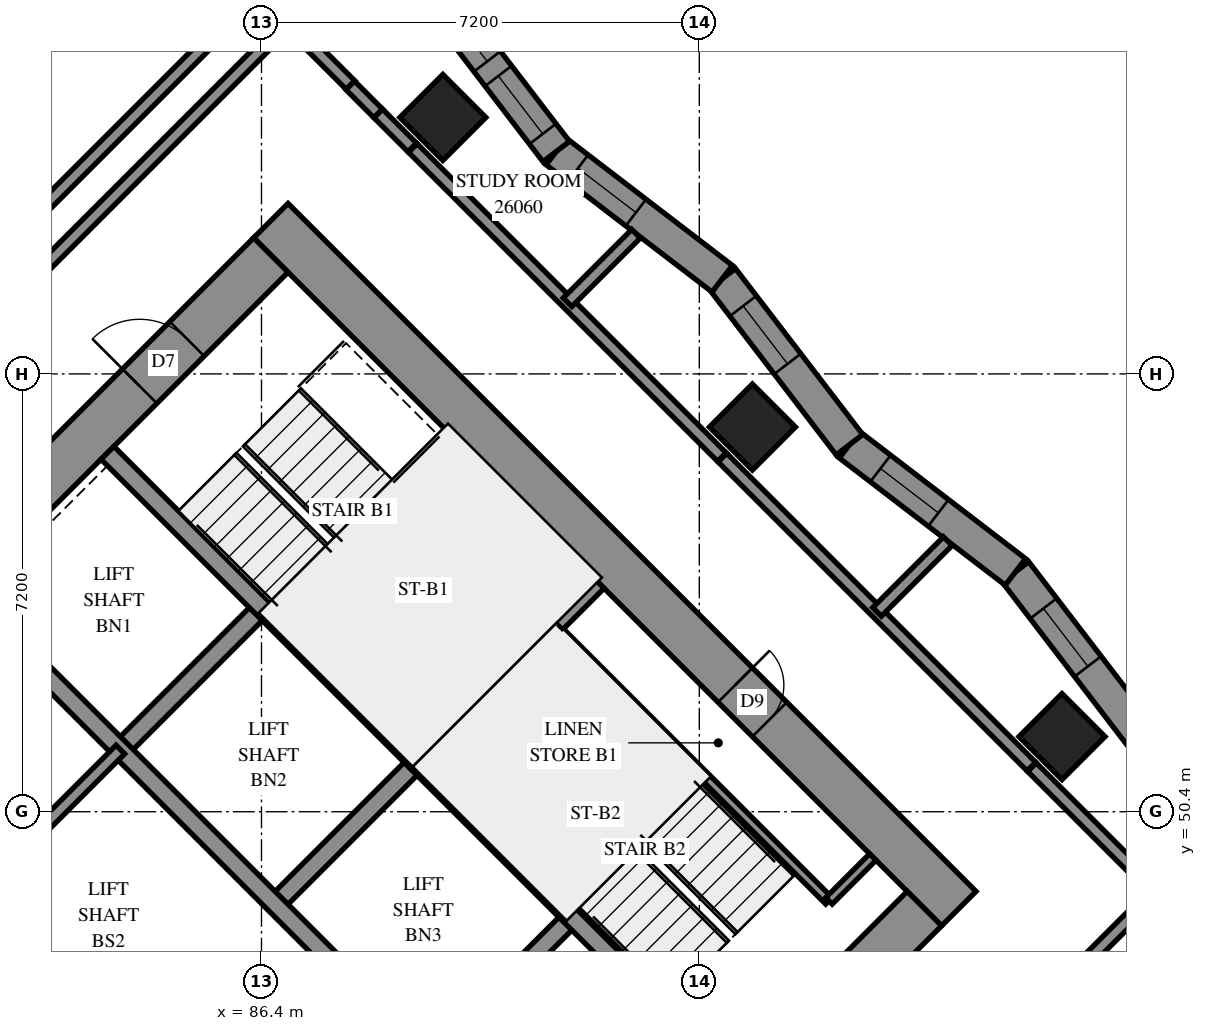
"""IFC4 building model, lengths in metres.
Left out: names, types, materials, properties, quantities, classifications, styles, units other than length and angle.
Written with IfcOpenShell. Run it as: python <this file> out.ifc"""

import sys

from ifc_helpers import new_model, si_unit, direction, frame, frame_2d, origin, origin_2d, place, context, subcontext, project, spatial, polyline, rectangle, outline, extrude, element, fill, save


model = new_model("IFC4")
c1 = context("Model", 3, precision=1e-05, world=origin(), true_north=direction((0.0, 1.0)))
c2 = subcontext(c1, "Body", "Model", "MODEL_VIEW")
j1 = project(units=[si_unit("LENGTHUNIT", "METRE"), si_unit("PLANEANGLEUNIT", "RADIAN")], contexts=[c1])
p1 = place(None, origin())
s1 = spatial("IfcSite", under=j1, at=p1, CompositionType="ELEMENT")
p2 = place(p1, origin())
s2 = spatial("IfcBuilding", under=s1, at=p2, CompositionType="ELEMENT")
p3 = place(p2, frame((0.0, 0.0, 98.2)))
s3 = spatial("IfcBuildingStorey", under=s2, at=p3, CompositionType="ELEMENT", Elevation=98.2)
for number, where, z_axis, x_axis in (
    (1, (89.382, 61.818, 0.0), (0.0, 0.0, 1.0), (0.707, -0.707, 0.0)),
    (2, (94.474, 56.727, 0.0), (0.0, 0.0, 1.0), (0.707, -0.707, 0.0)),
    (3, (99.565, 51.635, 0.0), (0.0, 0.0, 1.0), (0.707, -0.707, 0.0)),
):
    element("IfcColumn", number, at=place(p3, frame(where, z_axis=z_axis, x_axis=x_axis)), inside=s3, PredefinedType="COLUMN", context=c2, shape_type="SweptSolid", body=[
        extrude(rectangle(XDim=1.0, YDim=1.0, at=origin_2d()), origin(), (0.0, 0.0, 1.0), 3.1),
    ])
p4 = place(p3, frame((75.806, 49.373, -0.3), z_axis=(0.0, 0.0, 1.0), x_axis=(0.7071067812, -0.7071067812, 0.0)))
e4 = element("IfcWall", 4, at=p4, inside=s3, PredefinedType="SHEAR", context=c2, shape_type="SweptSolid", body=[
    extrude(rectangle(XDim=16.0, YDim=0.8, at=frame_2d((8.0, 0.0))), origin(), (0.0, 0.0, 1.0), 2.7),
])
p5 = place(p3, frame((86.554, 60.121, -0.3), z_axis=(0.0, 0.0, 1.0), x_axis=(0.7071067812, -0.7071067812, 0.0)))
e5 = element("IfcWall", 5, at=p5, inside=s3, PredefinedType="SHEAR", context=c2, shape_type="SweptSolid", body=[
    extrude(rectangle(XDim=16.0, YDim=0.8, at=frame_2d((8.0, 0.0))), origin(), (0.0, 0.0, 1.0), 2.7),
])
p6 = place(p5, frame((10.8, 0.0, 0.3)))
e6 = element("IfcOpeningElement", 6, at=p6, cuts=e5, PredefinedType="OPENING", context=c2, shape_type="SweptSolid", body=[
    extrude(rectangle(XDim=0.8, YDim=2.1, at=frame_2d((0.4, 1.05))), frame((0.0, 0.41, 0.0), z_axis=(0.0, -1.0, 0.0), x_axis=(1.0, 0.0, 0.0)), (0.0, 0.0, 1.0), 0.82),
])
p7 = place(p3, frame((76.372, 49.373, -0.3), z_axis=(0.0, 0.0, 1.0), x_axis=(0.7071067812, 0.7071067812, 0.0)))
e7 = element("IfcWall", 7, at=p7, inside=s3, PredefinedType="SHEAR", context=c2, shape_type="SweptSolid", body=[
    extrude(rectangle(XDim=14.4, YDim=0.8, at=frame_2d((7.2, 0.0))), origin(), (0.0, 0.0, 1.0), 2.7),
])
p8 = place(p7, frame((4.55, 0.0, 0.3)))
e8 = element("IfcOpeningElement", 8, at=p8, cuts=e7, PredefinedType="OPENING", context=c2, shape_type="SweptSolid", body=[
    extrude(rectangle(XDim=1.1, YDim=2.1, at=frame_2d((0.55, 1.05))), frame((0.0, 0.41, 0.0), z_axis=(0.0, -1.0, 0.0), x_axis=(1.0, 0.0, 0.0)), (0.0, 0.0, 1.0), 0.82),
])
p9 = place(p7, frame((11.35, 0.0, 0.3)))
e9 = element("IfcOpeningElement", 9, at=p9, cuts=e7, PredefinedType="OPENING", context=c2, shape_type="SweptSolid", body=[
    extrude(rectangle(XDim=1.1, YDim=2.1, at=frame_2d((0.55, 1.05))), frame((0.0, 0.41, 0.0), z_axis=(0.0, -1.0, 0.0), x_axis=(1.0, 0.0, 0.0)), (0.0, 0.0, 1.0), 0.82),
])
p10 = place(p3, frame((87.12, 38.625, -0.3), z_axis=(0.0, 0.0, 1.0), x_axis=(0.7071067812, 0.7071067812, 0.0)))
e10 = element("IfcWall", 10, at=p10, inside=s3, PredefinedType="SHEAR", context=c2, shape_type="SweptSolid", body=[
    extrude(rectangle(XDim=14.4, YDim=0.8, at=frame_2d((7.2, 0.0))), origin(), (0.0, 0.0, 1.0), 2.7),
])
p11 = place(p10, frame((4.55, 0.0, 0.3)))
e11 = element("IfcOpeningElement", 11, at=p11, cuts=e10, PredefinedType="OPENING", context=c2, shape_type="SweptSolid", body=[
    extrude(rectangle(XDim=1.1, YDim=2.1, at=frame_2d((0.55, 1.05))), frame((0.0, 0.41, 0.0), z_axis=(0.0, -1.0, 0.0), x_axis=(1.0, 0.0, 0.0)), (0.0, 0.0, 1.0), 0.82),
])
p12 = place(p10, frame((11.35, 0.0, 0.3)))
e12 = element("IfcOpeningElement", 12, at=p12, cuts=e10, PredefinedType="OPENING", context=c2, shape_type="SweptSolid", body=[
    extrude(rectangle(XDim=1.1, YDim=2.1, at=frame_2d((0.55, 1.05))), frame((0.0, 0.41, 0.0), z_axis=(0.0, -1.0, 0.0), x_axis=(1.0, 0.0, 0.0)), (0.0, 0.0, 1.0), 0.82),
])
p13 = place(p3, frame((84.079, 51.423, 0.0), z_axis=(0.0, 0.0, 1.0), x_axis=(0.7071219326, 0.7070916295, 0.0)))
e13 = element("IfcWall", 13, at=p13, inside=s3, PredefinedType="SOLIDWALL", context=c2, shape_type="SweptSolid", body=[
    extrude(rectangle(XDim=3.3, YDim=0.3, at=frame_2d((1.65, 0.0))), origin(), (0.0, 0.0, 1.0), 3.1),
])
for number, where, z_axis, x_axis in (
    (14, (86.625, 48.878, 0.0), (0.0, 0.0, 1.0), (0.707, 0.707, 0.0)),
    (15, (89.17, 46.332, 0.0), (0.0, 0.0, 1.0), (0.707, 0.707, 0.0)),
):
    element("IfcWall", number, at=place(p3, frame(where, z_axis=z_axis, x_axis=x_axis)), inside=s3, PredefinedType="SOLIDWALL", context=c2, shape_type="SweptSolid", body=[
        extrude(rectangle(XDim=3.3, YDim=0.3, at=frame_2d((1.65, 0.0))), origin(), (0.0, 0.0, 1.0), 3.1),
    ])
p14 = place(p3, frame((78.988, 51.423, 0.0), z_axis=(0.0, 0.0, 1.0), x_axis=(0.7071067812, -0.7071067812, 0.0)))
e16 = element("IfcWall", 16, at=p14, inside=s3, PredefinedType="SOLIDWALL", context=c2, shape_type="SweptSolid", body=[
    extrude(rectangle(XDim=14.4, YDim=0.3, at=frame_2d((7.2, 0.0))), origin(), (0.0, 0.0, 1.0), 3.1),
])
p15 = place(p14, frame((1.25, 0.0, 0.0)))
e17 = element("IfcOpeningElement", 17, at=p15, cuts=e16, PredefinedType="OPENING", context=c2, shape_type="SweptSolid", body=[
    extrude(rectangle(XDim=1.1, YDim=2.1, at=frame_2d((0.55, 1.05))), frame((0.0, 0.16, 0.0), z_axis=(0.0, -1.0, 0.0), x_axis=(1.0, 0.0, 0.0)), (0.0, 0.0, 1.0), 0.32),
])
p16 = place(p14, frame((4.85, 0.0, 0.0)))
e18 = element("IfcOpeningElement", 18, at=p16, cuts=e16, PredefinedType="OPENING", context=c2, shape_type="SweptSolid", body=[
    extrude(rectangle(XDim=1.1, YDim=2.1, at=frame_2d((0.55, 1.05))), frame((0.0, 0.16, 0.0), z_axis=(0.0, -1.0, 0.0), x_axis=(1.0, 0.0, 0.0)), (0.0, 0.0, 1.0), 0.32),
])
p17 = place(p14, frame((8.45, 0.0, 0.0)))
e19 = element("IfcOpeningElement", 19, at=p17, cuts=e16, PredefinedType="OPENING", context=c2, shape_type="SweptSolid", body=[
    extrude(rectangle(XDim=1.1, YDim=2.1, at=frame_2d((0.55, 1.05))), frame((0.0, 0.16, 0.0), z_axis=(0.0, -1.0, 0.0), x_axis=(1.0, 0.0, 0.0)), (0.0, 0.0, 1.0), 0.32),
])
p18 = place(p14, frame((12.05, 0.0, 0.0)))
e20 = element("IfcOpeningElement", 20, at=p18, cuts=e16, PredefinedType="OPENING", context=c2, shape_type="SweptSolid", body=[
    extrude(rectangle(XDim=1.1, YDim=2.1, at=frame_2d((0.55, 1.05))), frame((0.0, 0.16, 0.0), z_axis=(0.0, -1.0, 0.0), x_axis=(1.0, 0.0, 0.0)), (0.0, 0.0, 1.0), 0.32),
])
p19 = place(p3, frame((81.534, 53.969, 0.0), z_axis=(0.0, 0.0, 1.0), x_axis=(0.707103309, -0.7071102534, 0.0)))
e21 = element("IfcWall", 21, at=p19, inside=s3, PredefinedType="SOLIDWALL", context=c2, shape_type="SweptSolid", body=[
    extrude(rectangle(XDim=14.4, YDim=0.3, at=frame_2d((7.2, 0.0))), origin(), (0.0, 0.0, 1.0), 3.1),
])
p20 = place(p19, frame((12.05, 0.0, 0.0)))
e22 = element("IfcOpeningElement", 22, at=p20, cuts=e21, PredefinedType="OPENING", context=c2, shape_type="SweptSolid", body=[
    extrude(rectangle(XDim=1.1, YDim=2.1, at=frame_2d((0.55, 1.05))), frame((0.0, 0.16, 0.0), z_axis=(0.0, -1.0, 0.0), x_axis=(1.0, 0.0, 0.0)), (0.0, 0.0, 1.0), 0.32),
])
for number, where, z_axis, x_axis in (
    (23, (83.867, 56.302, 0.0), (0.0, 0.0, 1.0), (0.707, -0.707, 0.0)),
    (24, (88.958, 51.211, 0.0), (0.0, 0.0, 1.0), (0.707, -0.707, 0.0)),
):
    element("IfcWall", number, at=place(p3, frame(where, z_axis=z_axis, x_axis=x_axis)), inside=s3, PredefinedType="SOLIDWALL", context=c2, shape_type="SweptSolid", body=[
        extrude(rectangle(XDim=7.2, YDim=0.3, at=frame_2d((3.6, 0.0))), origin(), (0.0, 0.0, 1.0), 3.1),
    ])
p21 = place(p3, frame((88.958, 51.211, 0.0), z_axis=(0.0, 0.0, 1.0), x_axis=(0.7071067812, 0.7071067812, 0.0)))
e25 = element("IfcWall", 25, at=p21, inside=s3, PredefinedType="SOLIDWALL", context=c2, shape_type="SweptSolid", body=[
    extrude(rectangle(XDim=4.2, YDim=0.3, at=frame_2d((2.1, 0.0))), origin(), (0.0, 0.0, 1.0), 3.1),
])
p22 = place(p3, frame((100.891, 51.614, 0.0), z_axis=(0.0, 0.0, 1.0), x_axis=(-0.6082581669, 0.7937392534, 0.0)))
e26 = element("IfcWall", 26, at=p22, inside=s3, PredefinedType="SOLIDWALL", context=c2, shape_type="SweptSolid", body=[
    extrude(outline(polyline([(0.036, -0.275), (3.475, -0.275), (3.403, 0.275), (-0.036, 0.275), (0.036, -0.275)])), origin(), (0.0, 0.0, 1.0), 3.1),
])
p23 = place(p22, frame((1.482, 0.0, 0.5)))
e27 = element("IfcOpeningElement", 27, at=p23, cuts=e26, PredefinedType="OPENING", context=c2, shape_type="SweptSolid", body=[
    extrude(rectangle(XDim=1.2, YDim=2.45, at=frame_2d((0.6, 1.225))), frame((0.0, 0.285, 0.0), z_axis=(0.0, -1.0, 0.0), x_axis=(1.0, 0.0, 0.0)), (0.0, 0.0, 1.0), 0.57),
])
p24 = place(p3, frame((98.799, 54.344, 0.0), z_axis=(0.0, 0.0, 1.0), x_axis=(-0.7937392534, 0.6082581669, 0.0)))
e28 = element("IfcWall", 28, at=p24, inside=s3, PredefinedType="SOLIDWALL", context=c2, shape_type="SweptSolid", body=[
    extrude(outline(polyline([(-0.036, -0.275), (3.403, -0.275), (3.475, 0.275), (0.036, 0.275), (-0.036, -0.275)])), origin(), (0.0, 0.0, 1.0), 3.1),
])
p25 = place(p24, frame((1.596, 0.0, 0.5)))
e29 = element("IfcOpeningElement", 29, at=p25, cuts=e28, PredefinedType="OPENING", context=c2, shape_type="SweptSolid", body=[
    extrude(rectangle(XDim=1.2, YDim=2.45, at=frame_2d((0.6, 1.225))), frame((0.0, 0.285, 0.0), z_axis=(0.0, -1.0, 0.0), x_axis=(1.0, 0.0, 0.0)), (0.0, 0.0, 1.0), 0.57),
])
p26 = place(p3, frame((96.069, 56.436, 0.0), z_axis=(0.0, 0.0, 1.0), x_axis=(-0.6082581669, 0.7937392534, 0.0)))
e30 = element("IfcWall", 30, at=p26, inside=s3, PredefinedType="SOLIDWALL", context=c2, shape_type="SweptSolid", body=[
    extrude(outline(polyline([(0.036, -0.275), (3.475, -0.275), (3.403, 0.275), (-0.036, 0.275), (0.036, -0.275)])), origin(), (0.0, 0.0, 1.0), 3.1),
])
p27 = place(p26, frame((1.674, 0.0, 0.5)))
e31 = element("IfcOpeningElement", 31, at=p27, cuts=e30, PredefinedType="OPENING", context=c2, shape_type="SweptSolid", body=[
    extrude(rectangle(XDim=1.2, YDim=2.45, at=frame_2d((0.6, 1.225))), frame((0.0, 0.285, 0.0), z_axis=(0.0, -1.0, 0.0), x_axis=(1.0, 0.0, 0.0)), (0.0, 0.0, 1.0), 0.57),
])
p28 = place(p3, frame((93.977, 59.166, 0.0), z_axis=(0.0, 0.0, 1.0), x_axis=(-0.7937392534, 0.6082581669, 0.0)))
e32 = element("IfcWall", 32, at=p28, inside=s3, PredefinedType="SOLIDWALL", context=c2, shape_type="SweptSolid", body=[
    extrude(outline(polyline([(-0.036, -0.275), (3.403, -0.275), (3.475, 0.275), (0.036, 0.275), (-0.036, -0.275)])), origin(), (0.0, 0.0, 1.0), 3.1),
])
p29 = place(p28, frame((1.788, 0.0, 0.5)))
e33 = element("IfcOpeningElement", 33, at=p29, cuts=e32, PredefinedType="OPENING", context=c2, shape_type="SweptSolid", body=[
    extrude(rectangle(XDim=1.2, YDim=2.45, at=frame_2d((0.6, 1.225))), frame((0.0, 0.285, 0.0), z_axis=(0.0, -1.0, 0.0), x_axis=(1.0, 0.0, 0.0)), (0.0, 0.0, 1.0), 0.57),
])
p30 = place(p3, frame((91.247, 61.257, 0.0), z_axis=(0.0, 0.0, 1.0), x_axis=(-0.6082581669, 0.7937392534, 0.0)))
e34 = element("IfcWall", 34, at=p30, inside=s3, PredefinedType="SOLIDWALL", context=c2, shape_type="SweptSolid", body=[
    extrude(outline(polyline([(0.036, -0.275), (3.475, -0.275), (3.403, 0.275), (-0.036, 0.275), (0.036, -0.275)])), origin(), (0.0, 0.0, 1.0), 3.1),
])
p31 = place(p30, frame((0.365, 0.0, 0.5)))
e35 = element("IfcOpeningElement", 35, at=p31, cuts=e34, PredefinedType="OPENING", context=c2, shape_type="SweptSolid", body=[
    extrude(rectangle(XDim=1.2, YDim=2.45, at=frame_2d((0.6, 1.225))), frame((0.0, 0.285, 0.0), z_axis=(0.0, -1.0, 0.0), x_axis=(1.0, 0.0, 0.0)), (0.0, 0.0, 1.0), 0.57),
])
p32 = place(p30, frame((1.866, 0.0, 0.5)))
e36 = element("IfcOpeningElement", 36, at=p32, cuts=e34, PredefinedType="OPENING", context=c2, shape_type="SweptSolid", body=[
    extrude(rectangle(XDim=1.2, YDim=2.45, at=frame_2d((0.6, 1.225))), frame((0.0, 0.285, 0.0), z_axis=(0.0, -1.0, 0.0), x_axis=(1.0, 0.0, 0.0)), (0.0, 0.0, 1.0), 0.57),
])
p33 = place(p3, frame((91.313, 53.354, 0.0), z_axis=(0.0, 0.0, 1.0), x_axis=(0.7071147811, -0.7070987812, 0.0)))
e37 = element("IfcWall", 37, at=p33, inside=s3, PredefinedType="PARTITIONING", context=c2, shape_type="SweptSolid", body=[
    extrude(rectangle(XDim=6.25, YDim=0.15, at=frame_2d((3.125, 0.0))), origin(), (0.0, 0.0, 1.0), 3.1),
])
p34 = place(p3, frame((95.732, 48.934, 0.0), z_axis=(0.0, 0.0, 1.0), x_axis=(0.7071067812, 0.7071067812, 0.0)))
e38 = element("IfcWall", 38, at=p34, inside=s3, PredefinedType="PARTITIONING", context=c2, shape_type="SweptSolid", body=[
    extrude(rectangle(XDim=1.02, YDim=0.15, at=frame_2d((0.51, 0.0))), origin(), (0.0, 0.0, 1.0), 3.1),
])
p35 = place(p3, frame((81.534, 48.878, 0.0), z_axis=(0.0, 0.0, 1.0), x_axis=(0.707092892, 0.7071206701, 0.0)))
e39 = element("IfcWall", 39, at=p35, inside=s3, PredefinedType="PARTITIONING", context=c2, shape_type="SweptSolid", body=[
    extrude(rectangle(XDim=3.6, YDim=0.2, at=frame_2d((1.8, 0.0))), origin(), (0.0, 0.0, 1.0), 3.1),
])
p36 = place(p3, frame((94.615, 42.587, 0.0), z_axis=(0.0, 0.0, 1.0), x_axis=(0.7071067812, 0.7071067812, 0.0)))
e40 = element("IfcWall", 40, at=p36, inside=s3, PredefinedType="PARTITIONING", context=c2, shape_type="SweptSolid", body=[
    extrude(rectangle(XDim=9.198, YDim=0.2, at=frame_2d((4.599, 0.0))), origin(), (0.0, 0.0, 1.0), 3.1),
])
p37 = place(p36, frame((0.248, 0.0, 0.0)))
e41 = element("IfcOpeningElement", 41, at=p37, cuts=e40, PredefinedType="OPENING", context=c2, shape_type="SweptSolid", body=[
    extrude(rectangle(XDim=1.0, YDim=2.1, at=frame_2d((0.5, 1.05))), frame((0.0, 0.11, 0.0), z_axis=(0.0, -1.0, 0.0), x_axis=(1.0, 0.0, 0.0)), (0.0, 0.0, 1.0), 0.22),
])
p38 = place(p3, frame((80.949, 58.477, 0.0), z_axis=(0.0, 0.0, 1.0), x_axis=(0.7071067812, 0.7071067812, 0.0)))
e42 = element("IfcWall", 42, at=p38, inside=s3, PredefinedType="PARTITIONING", context=c2, shape_type="SweptSolid", body=[
    extrude(rectangle(XDim=9.169, YDim=0.2, at=frame_2d((4.585, 0.0))), origin(), (0.0, 0.0, 1.0), 3.1),
])
p39 = place(p3, frame((96.805, 43.787, 0.0), z_axis=(0.0, 0.0, 1.0), x_axis=(0.7071126661, 0.7071008962, 0.0)))
e43 = element("IfcWall", 43, at=p39, inside=s3, PredefinedType="PARTITIONING", context=c2, shape_type="SweptSolid", body=[
    extrude(rectangle(XDim=8.496, YDim=0.2, at=frame_2d((4.248, 0.0))), origin(), (0.0, 0.0, 1.0), 3.1),
])
p40 = place(p3, frame((80.951, 57.489, 0.0), z_axis=(0.0, 0.0, 1.0), x_axis=(0.7071067812, 0.7071067812, 0.0)))
e44 = element("IfcWall", 44, at=p40, inside=s3, PredefinedType="PARTITIONING", context=c2, shape_type="SweptSolid", body=[
    extrude(rectangle(XDim=8.321, YDim=0.2, at=frame_2d((4.161, 0.0))), origin(), (0.0, 0.0, 1.0), 3.1),
])
p41 = place(p40, frame((0.851, 0.0, 0.0)))
e45 = element("IfcOpeningElement", 45, at=p41, cuts=e44, PredefinedType="OPENING", context=c2, shape_type="SweptSolid", body=[
    extrude(rectangle(XDim=1.0, YDim=2.1, at=frame_2d((0.5, 1.05))), frame((0.0, 0.11, 0.0), z_axis=(0.0, -1.0, 0.0), x_axis=(1.0, 0.0, 0.0)), (0.0, 0.0, 1.0), 0.22),
])
p42 = place(p3, frame((88.889, 61.315, 0.0), z_axis=(0.0, 0.0, 1.0), x_axis=(0.7071067812, -0.7071067812, 0.0)))
e46 = element("IfcWall", 46, at=p42, inside=s3, PredefinedType="PARTITIONING", context=c2, shape_type="SweptSolid", body=[
    extrude(rectangle(XDim=7.187, YDim=0.2, at=frame_2d((3.594, 0.0))), origin(), (0.0, 0.0, 1.0), 3.1),
])
p43 = place(p3, frame((93.981, 56.223, 0.0), z_axis=(0.0, 0.0, 1.0), x_axis=(0.7071067812, -0.7071067812, 0.0)))
e47 = element("IfcWall", 47, at=p43, inside=s3, PredefinedType="PARTITIONING", context=c2, shape_type="SweptSolid", body=[
    extrude(rectangle(XDim=7.184, YDim=0.2, at=frame_2d((3.592, 0.0))), origin(), (0.0, 0.0, 1.0), 3.1),
])
p44 = place(p3, frame((99.071, 51.133, 0.0), z_axis=(0.0, 0.0, 1.0), x_axis=(0.7071067812, -0.7071067812, 0.0)))
e48 = element("IfcWall", 48, at=p44, inside=s3, PredefinedType="PARTITIONING", context=c2, shape_type="SweptSolid", body=[
    extrude(rectangle(XDim=2.893, YDim=0.2, at=frame_2d((1.447, 0.0))), origin(), (0.0, 0.0, 1.0), 3.1),
])
p45 = place(p3, frame((96.523, 53.687, 0.0), z_axis=(0.0, 0.0, 1.0), x_axis=(0.7070763817, 0.7071371793, 0.0)))
e49 = element("IfcWall", 49, at=p45, inside=s3, PredefinedType="PARTITIONING", context=c2, shape_type="SweptSolid", body=[
    extrude(rectangle(XDim=1.645, YDim=0.2, at=frame_2d((0.822, 0.0))), origin(), (0.0, 0.0, 1.0), 3.1),
])
p46 = place(p3, frame((91.432, 58.778, 0.0), z_axis=(0.0, 0.0, 1.0), x_axis=(0.7070754218, 0.7071381392, 0.0)))
e50 = element("IfcWall", 50, at=p46, inside=s3, PredefinedType="PARTITIONING", context=c2, shape_type="SweptSolid", body=[
    extrude(rectangle(XDim=1.595, YDim=0.2, at=frame_2d((0.797, 0.0))), origin(), (0.0, 0.0, 1.0), 3.1),
])
p47 = place(p3, frame((86.839, 63.373, 0.0), z_axis=(0.0, 0.0, 1.0), x_axis=(0.7077963046, -0.7064165847, 0.0)))
e51 = element("IfcWall", 51, at=p47, inside=s3, PredefinedType="PARTITIONING", context=c2, shape_type="SweptSolid", body=[
    extrude(rectangle(XDim=1.45, YDim=0.2, at=frame_2d((0.725, 0.0))), origin(), (0.0, 0.0, 1.0), 3.1),
])
p48 = place(p3, frame((88.319, 61.885, 0.0), z_axis=(0.0, 0.0, 1.0), x_axis=(0.7071067812, -0.7071067812, 0.0)))
e52 = element("IfcWall", 52, at=p48, inside=s3, PredefinedType="PARTITIONING", context=c2, shape_type="SweptSolid", body=[
    extrude(rectangle(XDim=0.792, YDim=0.2, at=frame_2d((0.396, 0.0))), origin(), (0.0, 0.0, 1.0), 3.1),
])
p49 = place(p3, frame((87.861, 62.344, 0.0), z_axis=(0.0, 0.0, 1.0), x_axis=(0.7055645691, -0.708645637, 0.0)))
e53 = element("IfcWall", 53, at=p49, inside=s3, PredefinedType="PARTITIONING", context=c2, shape_type="SweptSolid", body=[
    extrude(rectangle(XDim=0.649, YDim=0.2, at=frame_2d((0.325, 0.0))), origin(), (0.0, 0.0, 1.0), 3.1),
])
p50 = place(p23, origin())
e54 = element("IfcWindow", 54, at=p50, inside=s3, PartitioningType="SINGLE_PANEL", PredefinedType="WINDOW", context=c2, shape_type="SweptSolid", body=[
    extrude(rectangle(XDim=1.2, YDim=2.45, at=frame_2d((0.6, 1.225))), frame((0.0, 0.155, 0.0), z_axis=(0.0, -1.0, 0.0), x_axis=(1.0, 0.0, 0.0)), (0.0, 0.0, 1.0), 0.06),
])
fill(e27, e54)
p51 = place(p25, origin())
e55 = element("IfcWindow", 55, at=p51, inside=s3, PartitioningType="SINGLE_PANEL", PredefinedType="WINDOW", context=c2, shape_type="SweptSolid", body=[
    extrude(rectangle(XDim=1.2, YDim=2.45, at=frame_2d((0.6, 1.225))), frame((0.0, 0.155, 0.0), z_axis=(0.0, -1.0, 0.0), x_axis=(1.0, 0.0, 0.0)), (0.0, 0.0, 1.0), 0.06),
])
fill(e29, e55)
p52 = place(p27, origin())
e56 = element("IfcWindow", 56, at=p52, inside=s3, PartitioningType="SINGLE_PANEL", PredefinedType="WINDOW", context=c2, shape_type="SweptSolid", body=[
    extrude(rectangle(XDim=1.2, YDim=2.45, at=frame_2d((0.6, 1.225))), frame((0.0, 0.155, 0.0), z_axis=(0.0, -1.0, 0.0), x_axis=(1.0, 0.0, 0.0)), (0.0, 0.0, 1.0), 0.06),
])
fill(e31, e56)
p53 = place(p29, origin())
e57 = element("IfcWindow", 57, at=p53, inside=s3, PartitioningType="SINGLE_PANEL", PredefinedType="WINDOW", context=c2, shape_type="SweptSolid", body=[
    extrude(rectangle(XDim=1.2, YDim=2.45, at=frame_2d((0.6, 1.225))), frame((0.0, 0.155, 0.0), z_axis=(0.0, -1.0, 0.0), x_axis=(1.0, 0.0, 0.0)), (0.0, 0.0, 1.0), 0.06),
])
fill(e33, e57)
p54 = place(p31, origin())
e58 = element("IfcWindow", 58, at=p54, inside=s3, PartitioningType="SINGLE_PANEL", PredefinedType="WINDOW", context=c2, shape_type="SweptSolid", body=[
    extrude(rectangle(XDim=1.2, YDim=2.45, at=frame_2d((0.6, 1.225))), frame((0.0, 0.155, 0.0), z_axis=(0.0, -1.0, 0.0), x_axis=(1.0, 0.0, 0.0)), (0.0, 0.0, 1.0), 0.06),
])
fill(e35, e58)
p55 = place(p32, origin())
e59 = element("IfcWindow", 59, at=p55, inside=s3, PartitioningType="SINGLE_PANEL", PredefinedType="WINDOW", context=c2, shape_type="SweptSolid", body=[
    extrude(rectangle(XDim=1.2, YDim=2.45, at=frame_2d((0.6, 1.225))), frame((0.0, 0.155, 0.0), z_axis=(0.0, -1.0, 0.0), x_axis=(1.0, 0.0, 0.0)), (0.0, 0.0, 1.0), 0.06),
])
fill(e36, e59)
p56 = place(p6, origin())
e60 = element("IfcDoor", 60, at=p56, inside=s3, OperationType="SINGLE_SWING_RIGHT", PredefinedType="DOOR", context=c2, shape_type="SweptSolid", body=[
    extrude(rectangle(XDim=0.8, YDim=2.1, at=frame_2d((0.4, 1.05))), frame((0.0, -0.34, 0.0), z_axis=(0.0, -1.0, 0.0), x_axis=(1.0, 0.0, 0.0)), (0.0, 0.0, 1.0), 0.05),
])
fill(e6, e60)
p57 = place(p9, origin())
e61 = element("IfcDoor", 61, at=p57, inside=s3, OperationType="SINGLE_SWING_LEFT", PredefinedType="DOOR", context=c2, shape_type="SweptSolid", body=[
    extrude(rectangle(XDim=1.1, YDim=2.1, at=frame_2d((0.55, 1.05))), frame((0.0, 0.025, 0.0), z_axis=(0.0, -1.0, 0.0), x_axis=(1.0, 0.0, 0.0)), (0.0, 0.0, 1.0), 0.05),
])
fill(e9, e61)
save(model, sys.argv[1])
